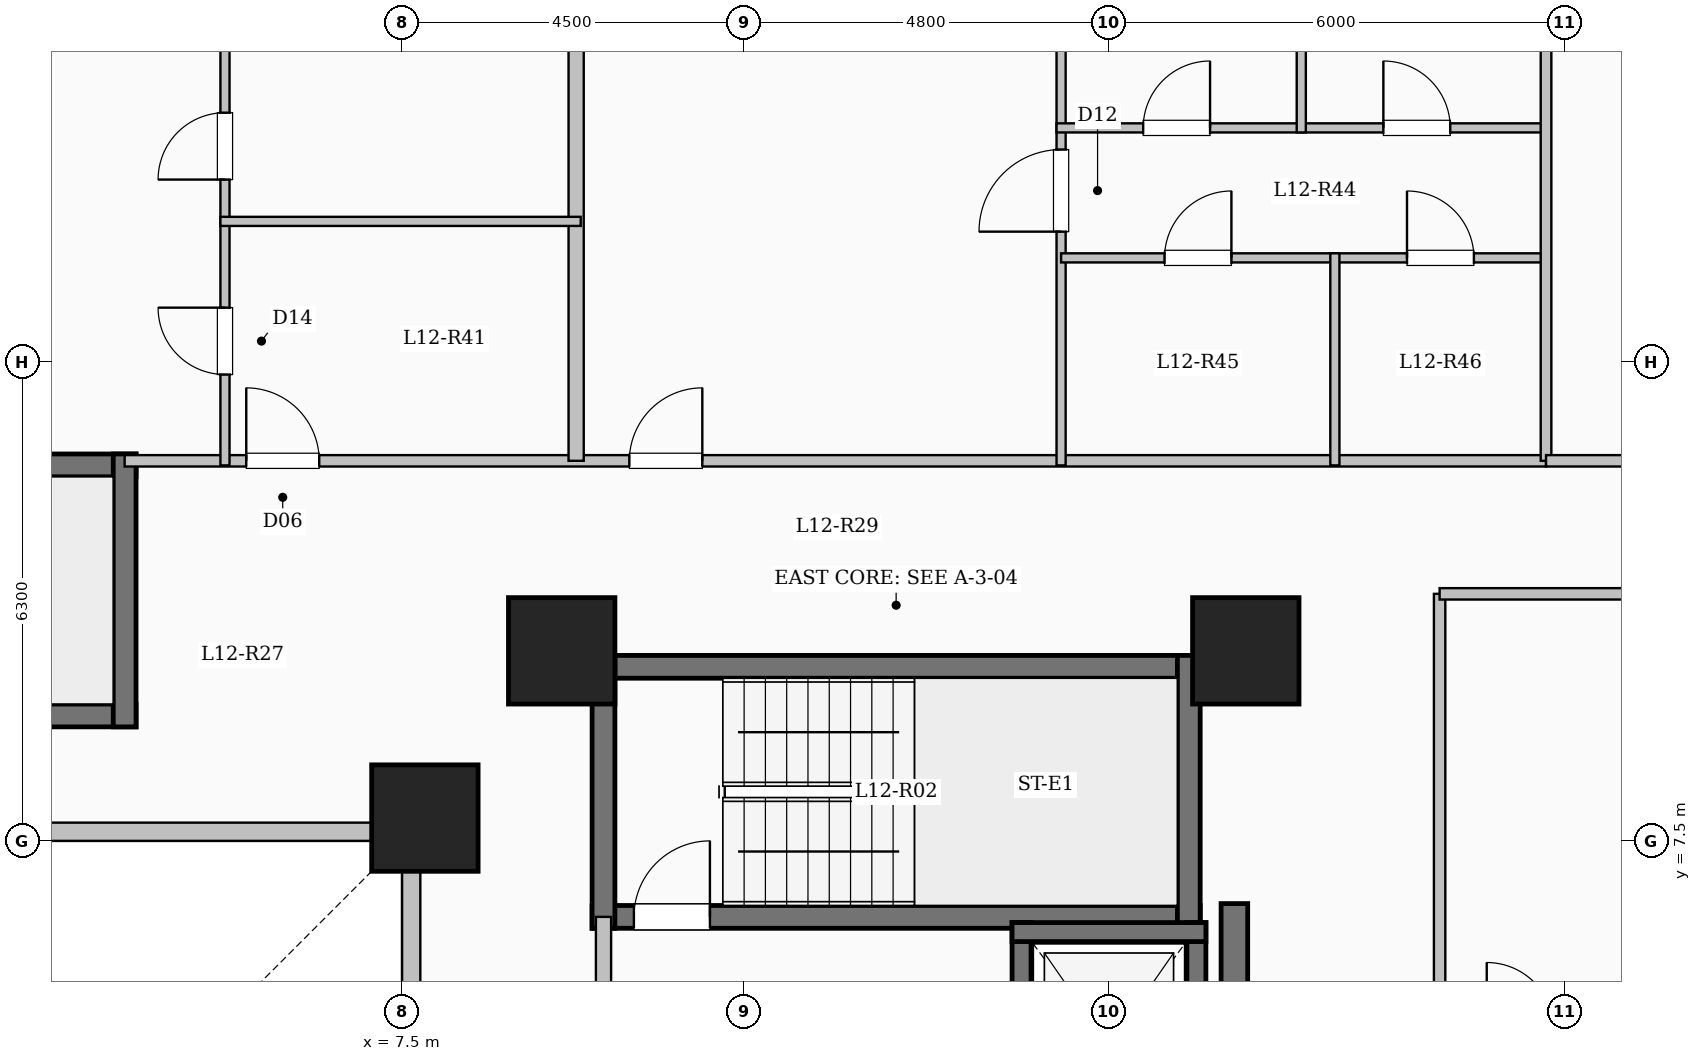
"""IFC4 building model, lengths in metres.
Left out: names, types, materials, properties, quantities, classifications, styles, units other than length and angle.
Written with IfcOpenShell. Run it as: python <this file> out.ifc"""

import sys

from ifc_helpers import new_model, si_unit, direction, frame, frame_2d, origin, origin_2d, place, context, subcontext, project, spatial, rectangle, extrude, element, fill, save


model = new_model("IFC4")
c1 = context("Model", 3, precision=1e-05, world=origin(), true_north=direction((0.0, 1.0)))
c2 = subcontext(c1, "Body", "Model", "MODEL_VIEW")
j1 = project(units=[si_unit("LENGTHUNIT", "METRE"), si_unit("PLANEANGLEUNIT", "RADIAN")], contexts=[c1])
p1 = place(None, origin())
s1 = spatial("IfcSite", under=j1, at=p1, CompositionType="ELEMENT")
p2 = place(p1, origin())
s2 = spatial("IfcBuilding", under=s1, at=p2, CompositionType="ELEMENT")
p3 = place(p2, frame((0.0, 0.0, 47.45)))
s3 = spatial("IfcBuildingStorey", under=s2, at=p3, CompositionType="ELEMENT", Elevation=47.45)
for number, where, z_axis, x_axis in (
    (1, (7.8, 7.8, 0.0), (0.0, 0.0, 1.0), (1.0, 0.0, 0.0)),
    (2, (9.6, 10.0, 0.0), (0.0, 0.0, 1.0), (1.0, 0.0, 0.0)),
    (3, (18.6, 10.0, 0.0), (0.0, 0.0, 1.0), (1.0, 0.0, 0.0)),
):
    element("IfcColumn", number, at=place(p3, frame(where, z_axis=z_axis, x_axis=x_axis)), inside=s3, PredefinedType="COLUMN", context=c2, shape_type="SweptSolid", body=[
        extrude(rectangle(XDim=1.4, YDim=1.4, at=origin_2d()), origin(), (0.0, 0.0, 1.0), 3.35),
    ])
p4 = place(p3, frame((7.62, -7.62, 0.0), z_axis=(0.0, 0.0, 1.0), x_axis=(0.0, 1.0, 0.0)))
e4 = element("IfcWall", 4, at=p4, inside=s3, PredefinedType="SOLIDWALL", context=c2, shape_type="SweptSolid", body=[
    extrude(rectangle(XDim=15.24, YDim=0.24, at=frame_2d((7.62, 0.0))), origin(), (0.0, 0.0, 1.0), 3.1),
])
p5 = place(p4, frame((6.92, 0.0, 0.95)))
e5 = element("IfcOpeningElement", 5, at=p5, cuts=e4, PredefinedType="OPENING", context=c2, shape_type="SweptSolid", body=[
    extrude(rectangle(XDim=1.4, YDim=1.5, at=frame_2d((0.7, 0.75))), frame((0.0, 0.13, 0.0), z_axis=(0.0, -1.0, 0.0), x_axis=(1.0, 0.0, 0.0)), (0.0, 0.0, 1.0), 0.26),
])
p6 = place(p3, frame((7.62, 7.62, 0.0), z_axis=(0.0, 0.0, 1.0), x_axis=(-1.0, 0.0, 0.0)))
e6 = element("IfcWall", 6, at=p6, inside=s3, PredefinedType="SOLIDWALL", context=c2, shape_type="SweptSolid", body=[
    extrude(rectangle(XDim=15.24, YDim=0.24, at=frame_2d((7.62, 0.0))), origin(), (0.0, 0.0, 1.0), 3.1),
])
p7 = place(p6, frame((6.92, 0.0, 0.95)))
e7 = element("IfcOpeningElement", 7, at=p7, cuts=e6, PredefinedType="OPENING", context=c2, shape_type="SweptSolid", body=[
    extrude(rectangle(XDim=1.4, YDim=1.5, at=frame_2d((0.7, 0.75))), frame((0.0, 0.13, 0.0), z_axis=(0.0, -1.0, 0.0), x_axis=(1.0, 0.0, 0.0)), (0.0, 0.0, 1.0), 0.26),
])
p8 = place(p3, frame((10.0, 9.79, 0.0), z_axis=(0.0, 0.0, 1.0), x_axis=(1.0, 0.0, 0.0)))
e8 = element("IfcWall", 8, at=p8, inside=s3, PredefinedType="SHEAR", context=c2, shape_type="SweptSolid", body=[
    extrude(rectangle(XDim=8.0, YDim=0.3, at=frame_2d((4.0, 0.0))), origin(), (0.0, 0.0, 1.0), 3.35),
])
p9 = place(p3, frame((10.0, 6.5, 0.0), z_axis=(0.0, 0.0, 1.0), x_axis=(1.0, 0.0, 0.0)))
e9 = element("IfcWall", 9, at=p9, inside=s3, PredefinedType="SHEAR", context=c2, shape_type="SweptSolid", body=[
    extrude(rectangle(XDim=8.0, YDim=0.3, at=frame_2d((4.0, 0.0))), origin(), (0.0, 0.0, 1.0), 3.35),
])
p10 = place(p9, frame((0.55, 0.0, 0.0)))
e10 = element("IfcOpeningElement", 10, at=p10, cuts=e9, PredefinedType="OPENING", context=c2, shape_type="SweptSolid", body=[
    extrude(rectangle(XDim=1.0, YDim=2.15, at=frame_2d((0.5, 1.075))), frame((0.0, 0.16, 0.0), z_axis=(0.0, -1.0, 0.0), x_axis=(1.0, 0.0, 0.0)), (0.0, 0.0, 1.0), 0.32),
])
for number, where, z_axis, x_axis in (
    (11, (10.15, 6.35, 0.0), (0.0, 0.0, 1.0), (0.0, 1.0, 0.0)),
    (12, (17.85, 6.35, 0.0), (0.0, 0.0, 1.0), (0.0, 1.0, 0.0)),
):
    element("IfcWall", number, at=place(p3, frame(where, z_axis=z_axis, x_axis=x_axis)), inside=s3, PredefinedType="SHEAR", context=c2, shape_type="SweptSolid", body=[
        extrude(rectangle(XDim=3.59, YDim=0.3, at=frame_2d((1.795, 0.0))), origin(), (0.0, 0.0, 1.0), 3.35),
    ])
p11 = place(p3, frame((-4.0, 12.44, 0.0), z_axis=(0.0, 0.0, 1.0), x_axis=(1.0, 0.0, 0.0)))
e13 = element("IfcWall", 13, at=p11, inside=s3, PredefinedType="SHEAR", context=c2, shape_type="SweptSolid", body=[
    extrude(rectangle(XDim=8.0, YDim=0.3, at=frame_2d((4.0, 0.0))), origin(), (0.0, 0.0, 1.0), 3.35),
])
p12 = place(p3, frame((-4.0, 9.15, 0.0), z_axis=(0.0, 0.0, 1.0), x_axis=(1.0, 0.0, 0.0)))
e14 = element("IfcWall", 14, at=p12, inside=s3, PredefinedType="SHEAR", context=c2, shape_type="SweptSolid", body=[
    extrude(rectangle(XDim=8.0, YDim=0.3, at=frame_2d((4.0, 0.0))), origin(), (0.0, 0.0, 1.0), 3.35),
])
p13 = place(p12, frame((0.55, 0.0, 0.0)))
e15 = element("IfcOpeningElement", 15, at=p13, cuts=e14, PredefinedType="OPENING", context=c2, shape_type="SweptSolid", body=[
    extrude(rectangle(XDim=1.0, YDim=2.15, at=frame_2d((0.5, 1.075))), frame((0.0, 0.16, 0.0), z_axis=(0.0, -1.0, 0.0), x_axis=(1.0, 0.0, 0.0)), (0.0, 0.0, 1.0), 0.32),
])
p14 = place(p3, frame((3.85, 9.0, 0.0), z_axis=(0.0, 0.0, 1.0), x_axis=(0.0, 1.0, 0.0)))
e16 = element("IfcWall", 16, at=p14, inside=s3, PredefinedType="SHEAR", context=c2, shape_type="SweptSolid", body=[
    extrude(rectangle(XDim=3.59, YDim=0.3, at=frame_2d((1.795, 0.0))), origin(), (0.0, 0.0, 1.0), 3.35),
])
p15 = place(p3, frame((10.15, 3.25, 0.0), z_axis=(0.0, 0.0, 1.0), x_axis=(0.0, 1.0, 0.0)))
e17 = element("IfcWall", 17, at=p15, inside=s3, PredefinedType="SOLIDWALL", context=c2, shape_type="SweptSolid", body=[
    extrude(rectangle(XDim=3.25, YDim=0.2, at=frame_2d((1.625, 0.0))), origin(), (0.0, 0.0, 1.0), 3.1),
])
p16 = place(p15, frame((1.1, 0.0, 0.0)))
e18 = element("IfcOpeningElement", 18, at=p16, cuts=e17, PredefinedType="OPENING", context=c2, shape_type="SweptSolid", body=[
    extrude(rectangle(XDim=1.02, YDim=2.15, at=frame_2d((0.51, 1.075))), frame((0.0, 0.11, 0.0), z_axis=(0.0, -1.0, 0.0), x_axis=(1.0, 0.0, 0.0)), (0.0, 0.0, 1.0), 0.22),
])
p17 = place(p3, frame((15.65, 3.175, 0.0), z_axis=(0.0, 0.0, 1.0), x_axis=(0.0, 1.0, 0.0)))
e19 = element("IfcWall", 19, at=p17, inside=s3, PredefinedType="SHEAR", context=c2, shape_type="SweptSolid", body=[
    extrude(rectangle(XDim=3.25, YDim=0.25, at=frame_2d((1.625, 0.0))), origin(), (0.0, 0.0, 1.0), 3.35),
])
p18 = place(p17, frame((1.075, 0.0, 0.0)))
e20 = element("IfcOpeningElement", 20, at=p18, cuts=e19, PredefinedType="OPENING", context=c2, shape_type="SweptSolid", body=[
    extrude(rectangle(XDim=1.1, YDim=2.15, at=frame_2d((0.55, 1.075))), frame((0.0, 0.135, 0.0), z_axis=(0.0, -1.0, 0.0), x_axis=(1.0, 0.0, 0.0)), (0.0, 0.0, 1.0), 0.27),
])
p19 = place(p3, frame((17.95, 3.175, 0.0), z_axis=(0.0, 0.0, 1.0), x_axis=(0.0, 1.0, 0.0)))
e21 = element("IfcWall", 21, at=p19, inside=s3, PredefinedType="SHEAR", context=c2, shape_type="SweptSolid", body=[
    extrude(rectangle(XDim=3.25, YDim=0.25, at=frame_2d((1.625, 0.0))), origin(), (0.0, 0.0, 1.0), 3.35),
])
p20 = place(p3, frame((15.525, 6.3, 0.0), z_axis=(0.0, 0.0, 1.0), x_axis=(1.0, 0.0, 0.0)))
e22 = element("IfcWall", 22, at=p20, inside=s3, PredefinedType="SHEAR", context=c2, shape_type="SweptSolid", body=[
    extrude(rectangle(XDim=2.55, YDim=0.25, at=frame_2d((1.275, 0.0))), origin(), (0.0, 0.0, 1.0), 3.35),
])
p21 = place(p3, frame((18.45, -7.375, 0.0), z_axis=(0.0, 0.0, 1.0), x_axis=(0.0, 1.0, 0.0)))
e23 = element("IfcWall", 23, at=p21, inside=s3, PredefinedType="SHEAR", context=c2, shape_type="SweptSolid", body=[
    extrude(rectangle(XDim=14.05, YDim=0.35, at=frame_2d((7.025, 0.0))), origin(), (0.0, 0.0, 1.0), 3.35),
])
p22 = place(p3, frame((3.85, 12.5, 0.0), z_axis=(0.0, 0.0, 1.0), x_axis=(1.0, 0.0, 0.0)))
e24 = element("IfcWall", 24, at=p22, inside=s3, PredefinedType="PARTITIONING", context=c2, shape_type="SweptSolid", body=[
    extrude(rectangle(XDim=18.7, YDim=0.15, at=frame_2d((9.35, 0.0))), origin(), (0.0, 0.0, 1.0), 3.1),
])
p23 = place(p22, frame((1.6, 0.0, 0.0)))
e25 = element("IfcOpeningElement", 25, at=p23, cuts=e24, PredefinedType="OPENING", context=c2, shape_type="SweptSolid", body=[
    extrude(rectangle(XDim=0.96, YDim=2.15, at=frame_2d((0.48, 1.075))), frame((0.0, 0.085, 0.0), z_axis=(0.0, -1.0, 0.0), x_axis=(1.0, 0.0, 0.0)), (0.0, 0.0, 1.0), 0.17),
])
p24 = place(p22, frame((6.64, 0.0, 0.0)))
e26 = element("IfcOpeningElement", 26, at=p24, cuts=e24, PredefinedType="OPENING", context=c2, shape_type="SweptSolid", body=[
    extrude(rectangle(XDim=0.96, YDim=2.15, at=frame_2d((0.48, 1.075))), frame((0.0, 0.085, 0.0), z_axis=(0.0, -1.0, 0.0), x_axis=(1.0, 0.0, 0.0)), (0.0, 0.0, 1.0), 0.17),
])
p25 = place(p3, frame((21.15, -7.25, 0.0), z_axis=(0.0, 0.0, 1.0), x_axis=(0.0, 1.0, 0.0)))
e27 = element("IfcWall", 27, at=p25, inside=s3, PredefinedType="PARTITIONING", context=c2, shape_type="SweptSolid", body=[
    extrude(rectangle(XDim=18.0, YDim=0.15, at=frame_2d((9.0, 0.0))), origin(), (0.0, 0.0, 1.0), 2.585),
])
p26 = place(p3, frame((9.79, 12.5, 0.0), z_axis=(0.0, 0.0, 1.0), x_axis=(0.0, 1.0, 0.0)))
e28 = element("IfcWall", 28, at=p26, inside=s3, PredefinedType="SOLIDWALL", context=c2, shape_type="SweptSolid", body=[
    extrude(rectangle(XDim=11.398, YDim=0.2, at=frame_2d((5.699, 0.0))), origin(), (0.0, 0.0, 1.0), 3.1),
])
p27 = place(p3, frame((5.17, 12.44, 0.0), z_axis=(0.0, 0.0, 1.0), x_axis=(0.0, 1.0, 0.0)))
e29 = element("IfcWall", 29, at=p27, inside=s3, PredefinedType="PARTITIONING", context=c2, shape_type="SweptSolid", body=[
    extrude(rectangle(XDim=3.21, YDim=0.12, at=frame_2d((1.605, 0.0))), origin(), (0.0, 0.0, 1.0), 3.1),
])
p28 = place(p27, frame((1.195, 0.0, 0.0)))
e30 = element("IfcOpeningElement", 30, at=p28, cuts=e29, PredefinedType="OPENING", context=c2, shape_type="SweptSolid", body=[
    extrude(rectangle(XDim=0.88, YDim=2.1, at=frame_2d((0.44, 1.05))), frame((0.0, 0.07, 0.0), z_axis=(0.0, -1.0, 0.0), x_axis=(1.0, 0.0, 0.0)), (0.0, 0.0, 1.0), 0.14),
])
p29 = place(p3, frame((5.17, 15.65, 0.0), z_axis=(0.0, 0.0, 1.0), x_axis=(0.0, 1.0, 0.0)))
e31 = element("IfcWall", 31, at=p29, inside=s3, PredefinedType="PARTITIONING", context=c2, shape_type="SweptSolid", body=[
    extrude(rectangle(XDim=9.388, YDim=0.12, at=frame_2d((4.694, 0.0))), origin(), (0.0, 0.0, 1.0), 3.1),
])
p30 = place(p29, frame((0.55, 0.0, 0.0)))
e32 = element("IfcOpeningElement", 32, at=p30, cuts=e31, PredefinedType="OPENING", context=c2, shape_type="SweptSolid", body=[
    extrude(rectangle(XDim=0.88, YDim=2.1, at=frame_2d((0.44, 1.05))), frame((0.0, 0.07, 0.0), z_axis=(0.0, -1.0, 0.0), x_axis=(1.0, 0.0, 0.0)), (0.0, 0.0, 1.0), 0.14),
])
p31 = place(p3, frame((5.11, 15.65, 0.0), z_axis=(0.0, 0.0, 1.0), x_axis=(1.0, 0.0, 0.0)))
e33 = element("IfcWall", 33, at=p31, inside=s3, PredefinedType="PARTITIONING", context=c2, shape_type="SweptSolid", body=[
    extrude(rectangle(XDim=4.74, YDim=0.12, at=frame_2d((2.37, 0.0))), origin(), (0.0, 0.0, 1.0), 3.1),
])
p32 = place(p3, frame((16.17, 12.44, 0.0), z_axis=(0.0, 0.0, 1.0), x_axis=(0.0, 1.0, 0.0)))
e34 = element("IfcWall", 34, at=p32, inside=s3, PredefinedType="PARTITIONING", context=c2, shape_type="SweptSolid", body=[
    extrude(rectangle(XDim=11.16, YDim=0.12, at=frame_2d((5.58, 0.0))), origin(), (0.0, 0.0, 1.0), 3.1),
])
p33 = place(p32, frame((3.075, 0.0, 0.0)))
e35 = element("IfcOpeningElement", 35, at=p33, cuts=e34, PredefinedType="OPENING", context=c2, shape_type="SweptSolid", body=[
    extrude(rectangle(XDim=1.08, YDim=2.15, at=frame_2d((0.54, 1.075))), frame((0.0, 0.07, 0.0), z_axis=(0.0, -1.0, 0.0), x_axis=(1.0, 0.0, 0.0)), (0.0, 0.0, 1.0), 0.14),
])
p34 = place(p3, frame((16.17, 15.17, 0.0), z_axis=(0.0, 0.0, 1.0), x_axis=(1.0, 0.0, 0.0)))
e36 = element("IfcWall", 36, at=p34, inside=s3, PredefinedType="PARTITIONING", context=c2, shape_type="SweptSolid", body=[
    extrude(rectangle(XDim=3.602, YDim=0.12, at=frame_2d((1.801, 0.0))), origin(), (0.0, 0.0, 1.0), 3.1),
])
p35 = place(p34, frame((1.361, 0.0, 0.0)))
e37 = element("IfcOpeningElement", 37, at=p35, cuts=e36, PredefinedType="OPENING", context=c2, shape_type="SweptSolid", body=[
    extrude(rectangle(XDim=0.88, YDim=2.1, at=frame_2d((0.44, 1.05))), frame((0.0, 0.07, 0.0), z_axis=(0.0, -1.0, 0.0), x_axis=(1.0, 0.0, 0.0)), (0.0, 0.0, 1.0), 0.14),
])
p36 = place(p3, frame((19.772, 15.17, 0.0), z_axis=(0.0, 0.0, 1.0), x_axis=(1.0, 0.0, 0.0)))
e38 = element("IfcWall", 38, at=p36, inside=s3, PredefinedType="PARTITIONING", context=c2, shape_type="SweptSolid", body=[
    extrude(rectangle(XDim=2.778, YDim=0.12, at=frame_2d((1.389, 0.0))), origin(), (0.0, 0.0, 1.0), 3.1),
])
p37 = place(p36, frame((0.949, 0.0, 0.0)))
e39 = element("IfcOpeningElement", 39, at=p37, cuts=e38, PredefinedType="OPENING", context=c2, shape_type="SweptSolid", body=[
    extrude(rectangle(XDim=0.88, YDim=2.1, at=frame_2d((0.44, 1.05))), frame((0.0, 0.07, 0.0), z_axis=(0.0, -1.0, 0.0), x_axis=(1.0, 0.0, 0.0)), (0.0, 0.0, 1.0), 0.14),
])
p38 = place(p3, frame((16.11, 16.88, 0.0), z_axis=(0.0, 0.0, 1.0), x_axis=(1.0, 0.0, 0.0)))
e40 = element("IfcWall", 40, at=p38, inside=s3, PredefinedType="PARTITIONING", context=c2, shape_type="SweptSolid", body=[
    extrude(rectangle(XDim=6.5, YDim=0.12, at=frame_2d((3.25, 0.0))), origin(), (0.0, 0.0, 1.0), 3.1),
])
p39 = place(p38, frame((1.14, 0.0, 0.0)))
e41 = element("IfcOpeningElement", 41, at=p39, cuts=e40, PredefinedType="OPENING", context=c2, shape_type="SweptSolid", body=[
    extrude(rectangle(XDim=0.88, YDim=2.1, at=frame_2d((0.44, 1.05))), frame((0.0, 0.07, 0.0), z_axis=(0.0, -1.0, 0.0), x_axis=(1.0, 0.0, 0.0)), (0.0, 0.0, 1.0), 0.14),
])
p40 = place(p38, frame((4.3, 0.0, 0.0)))
e42 = element("IfcOpeningElement", 42, at=p40, cuts=e40, PredefinedType="OPENING", context=c2, shape_type="SweptSolid", body=[
    extrude(rectangle(XDim=0.88, YDim=2.1, at=frame_2d((0.44, 1.05))), frame((0.0, 0.07, 0.0), z_axis=(0.0, -1.0, 0.0), x_axis=(1.0, 0.0, 0.0)), (0.0, 0.0, 1.0), 0.14),
])
p41 = place(p3, frame((19.772, 12.44, 0.0), z_axis=(0.0, 0.0, 1.0), x_axis=(0.0, 1.0, 0.0)))
e43 = element("IfcWall", 43, at=p41, inside=s3, PredefinedType="PARTITIONING", context=c2, shape_type="SweptSolid", body=[
    extrude(rectangle(XDim=2.79, YDim=0.12, at=frame_2d((1.395, 0.0))), origin(), (0.0, 0.0, 1.0), 3.1),
])
p42 = place(p3, frame((19.33, 16.82, 0.0), z_axis=(0.0, 0.0, 1.0), x_axis=(0.0, 1.0, 0.0)))
e44 = element("IfcWall", 44, at=p42, inside=s3, PredefinedType="PARTITIONING", context=c2, shape_type="SweptSolid", body=[
    extrude(rectangle(XDim=6.78, YDim=0.12, at=frame_2d((3.39, 0.0))), origin(), (0.0, 0.0, 1.0), 3.1),
])
p43 = place(p3, frame((21.15, 10.75, 0.0), z_axis=(0.0, 0.0, 1.0), x_axis=(1.0, 0.0, 0.0)))
e45 = element("IfcWall", 45, at=p43, inside=s3, PredefinedType="PARTITIONING", context=c2, shape_type="SweptSolid", body=[
    extrude(rectangle(XDim=7.53, YDim=0.15, at=frame_2d((3.765, 0.0))), origin(), (0.0, 0.0, 1.0), 3.1),
])
p44 = place(p3, frame((22.55, 12.5, 0.0), z_axis=(0.0, 0.0, 1.0), x_axis=(0.0, 1.0, 0.0)))
e46 = element("IfcWall", 46, at=p44, inside=s3, PredefinedType="PARTITIONING", context=c2, shape_type="SweptSolid", body=[
    extrude(rectangle(XDim=6.55, YDim=0.14, at=frame_2d((3.275, 0.0))), origin(), (0.0, 0.0, 1.0), 3.1),
])
p45 = place(p3, frame((22.55, 12.5, 0.0), z_axis=(0.0, 0.0, 1.0), x_axis=(1.0, 0.0, 0.0)))
e47 = element("IfcWall", 47, at=p45, inside=s3, PredefinedType="PARTITIONING", context=c2, shape_type="SweptSolid", body=[
    extrude(rectangle(XDim=6.13, YDim=0.15, at=frame_2d((3.065, 0.0))), origin(), (0.0, 0.0, 1.0), 3.1),
])
p46 = place(p45, frame((2.59, 0.0, 0.0)))
e48 = element("IfcOpeningElement", 48, at=p46, cuts=e47, PredefinedType="OPENING", context=c2, shape_type="SweptSolid", body=[
    extrude(rectangle(XDim=0.95, YDim=2.15, at=frame_2d((0.475, 1.075))), frame((0.0, 0.085, 0.0), z_axis=(0.0, -1.0, 0.0), x_axis=(1.0, 0.0, 0.0)), (0.0, 0.0, 1.0), 0.17),
])
p47 = place(p10, origin())
e49 = element("IfcDoor", 49, at=p47, inside=s3, OperationType="SINGLE_SWING_RIGHT", PredefinedType="DOOR", context=c2, shape_type="SweptSolid", body=[
    extrude(rectangle(XDim=1.0, YDim=2.15, at=frame_2d((0.5, 1.075))), frame((0.0, 0.025, 0.0), z_axis=(0.0, -1.0, 0.0), x_axis=(1.0, 0.0, 0.0)), (0.0, 0.0, 1.0), 0.05),
])
fill(e10, e49)
p48 = place(p23, origin())
e50 = element("IfcDoor", 50, at=p48, inside=s3, OperationType="SINGLE_SWING_LEFT", PredefinedType="DOOR", context=c2, shape_type="SweptSolid", body=[
    extrude(rectangle(XDim=0.96, YDim=2.15, at=frame_2d((0.48, 1.075))), frame((0.0, 0.025, 0.0), z_axis=(0.0, -1.0, 0.0), x_axis=(1.0, 0.0, 0.0)), (0.0, 0.0, 1.0), 0.05),
])
fill(e25, e50)
p49 = place(p28, origin())
e51 = element("IfcDoor", 51, at=p49, inside=s3, OperationType="SINGLE_SWING_RIGHT", PredefinedType="DOOR", context=c2, shape_type="SweptSolid", body=[
    extrude(rectangle(XDim=0.88, YDim=2.1, at=frame_2d((0.44, 1.05))), frame((0.0, 0.025, 0.0), z_axis=(0.0, -1.0, 0.0), x_axis=(1.0, 0.0, 0.0)), (0.0, 0.0, 1.0), 0.05),
])
fill(e30, e51)
p50 = place(p30, origin())
e52 = element("IfcDoor", 52, at=p50, inside=s3, OperationType="SINGLE_SWING_LEFT", PredefinedType="DOOR", context=c2, shape_type="SweptSolid", body=[
    extrude(rectangle(XDim=0.88, YDim=2.1, at=frame_2d((0.44, 1.05))), frame((0.0, 0.025, 0.0), z_axis=(0.0, -1.0, 0.0), x_axis=(1.0, 0.0, 0.0)), (0.0, 0.0, 1.0), 0.05),
])
fill(e32, e52)
p51 = place(p24, origin())
e53 = element("IfcDoor", 53, at=p51, inside=s3, OperationType="SINGLE_SWING_RIGHT", PredefinedType="DOOR", context=c2, shape_type="SweptSolid", body=[
    extrude(rectangle(XDim=0.96, YDim=2.15, at=frame_2d((0.48, 1.075))), frame((0.0, 0.025, 0.0), z_axis=(0.0, -1.0, 0.0), x_axis=(1.0, 0.0, 0.0)), (0.0, 0.0, 1.0), 0.05),
])
fill(e26, e53)
p52 = place(p33, origin())
e54 = element("IfcDoor", 54, at=p52, inside=s3, OperationType="SINGLE_SWING_LEFT", PredefinedType="DOOR", context=c2, shape_type="SweptSolid", body=[
    extrude(rectangle(XDim=1.08, YDim=2.15, at=frame_2d((0.54, 1.075))), frame((0.0, 0.025, 0.0), z_axis=(0.0, -1.0, 0.0), x_axis=(1.0, 0.0, 0.0)), (0.0, 0.0, 1.0), 0.05),
])
fill(e35, e54)
p53 = place(p35, origin())
e55 = element("IfcDoor", 55, at=p53, inside=s3, OperationType="SINGLE_SWING_RIGHT", PredefinedType="DOOR", context=c2, shape_type="SweptSolid", body=[
    extrude(rectangle(XDim=0.88, YDim=2.1, at=frame_2d((0.44, 1.05))), frame((0.0, 0.025, 0.0), z_axis=(0.0, -1.0, 0.0), x_axis=(1.0, 0.0, 0.0)), (0.0, 0.0, 1.0), 0.05),
])
fill(e37, e55)
p54 = place(p37, origin())
e56 = element("IfcDoor", 56, at=p54, inside=s3, OperationType="SINGLE_SWING_LEFT", PredefinedType="DOOR", context=c2, shape_type="SweptSolid", body=[
    extrude(rectangle(XDim=0.88, YDim=2.1, at=frame_2d((0.44, 1.05))), frame((0.0, 0.025, 0.0), z_axis=(0.0, -1.0, 0.0), x_axis=(1.0, 0.0, 0.0)), (0.0, 0.0, 1.0), 0.05),
])
fill(e39, e56)
p55 = place(p39, origin())
e57 = element("IfcDoor", 57, at=p55, inside=s3, OperationType="SINGLE_SWING_RIGHT", PredefinedType="DOOR", context=c2, shape_type="SweptSolid", body=[
    extrude(rectangle(XDim=0.88, YDim=2.1, at=frame_2d((0.44, 1.05))), frame((0.0, 0.025, 0.0), z_axis=(0.0, -1.0, 0.0), x_axis=(1.0, 0.0, 0.0)), (0.0, 0.0, 1.0), 0.05),
])
fill(e41, e57)
p56 = place(p40, origin())
e58 = element("IfcDoor", 58, at=p56, inside=s3, OperationType="SINGLE_SWING_LEFT", PredefinedType="DOOR", context=c2, shape_type="SweptSolid", body=[
    extrude(rectangle(XDim=0.88, YDim=2.1, at=frame_2d((0.44, 1.05))), frame((0.0, 0.025, 0.0), z_axis=(0.0, -1.0, 0.0), x_axis=(1.0, 0.0, 0.0)), (0.0, 0.0, 1.0), 0.05),
])
fill(e42, e58)
save(model, sys.argv[1])
